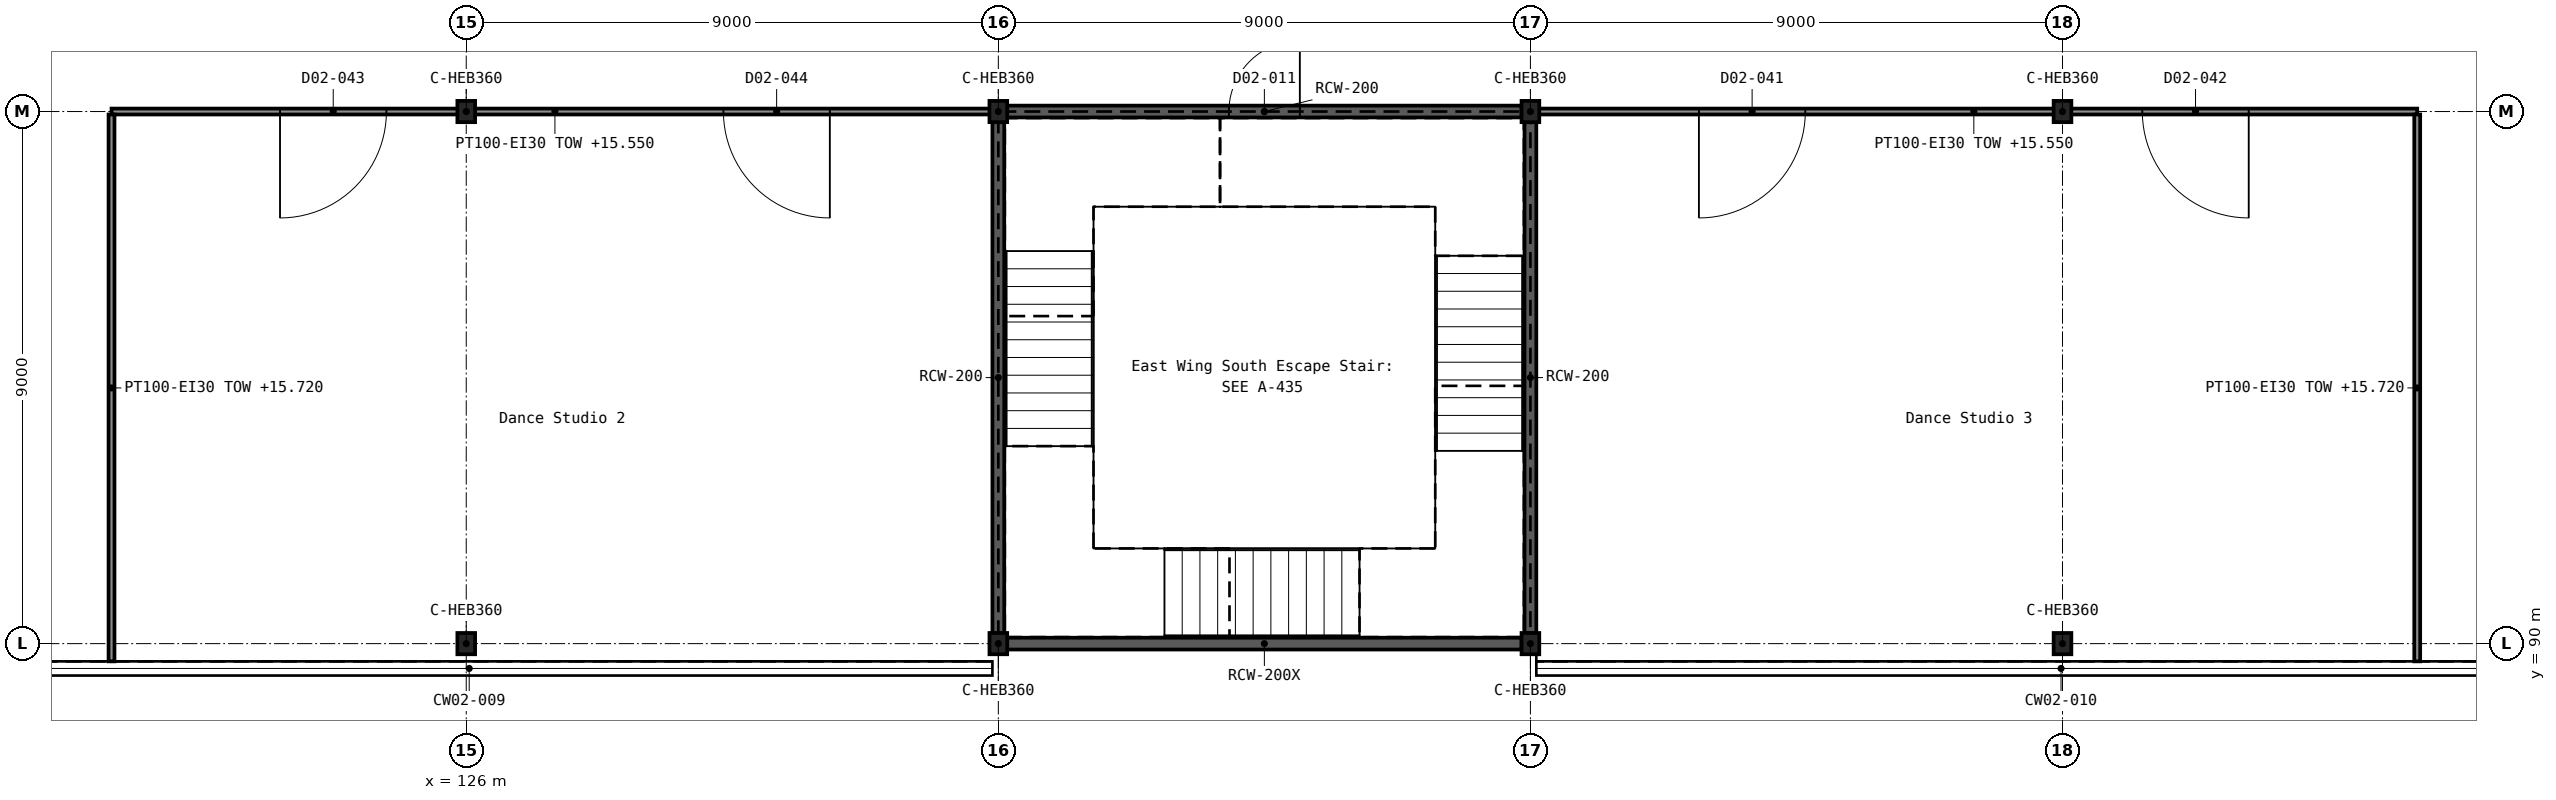
"""IFC4 building model, lengths in metres.
Left out: names, types, materials, properties, quantities, classifications, styles, units other than length and angle.
Written with IfcOpenShell. Run it as: python <this file> out.ifc"""

import sys

from ifc_helpers import new_model, si_unit, direction, frame, frame_2d, origin, origin_2d, place, context, subcontext, project, spatial, rectangle, i_section, extrude, element, fill, save


model = new_model("IFC4")
c1 = context("Model", 3, precision=1e-05, world=origin(), true_north=direction((0.0, 1.0)))
c2 = subcontext(c1, "Body", "Model", "MODEL_VIEW")
j1 = project(units=[si_unit("LENGTHUNIT", "METRE"), si_unit("PLANEANGLEUNIT", "RADIAN")], contexts=[c1])
p1 = place(None, origin())
s1 = spatial("IfcSite", under=j1, at=p1, CompositionType="ELEMENT")
p2 = place(p1, origin())
s2 = spatial("IfcBuilding", under=s1, at=p2, CompositionType="ELEMENT")
p3 = place(p2, frame((0.0, 0.0, 10.8)))
s3 = spatial("IfcBuildingStorey", under=s2, at=p3, CompositionType="ELEMENT", Elevation=10.8)
for number, where, z_axis, x_axis in (
    (1, (126.0, 90.0, 0.0), (0.0, 0.0, 1.0), (1.0, 0.0, 0.0)),
    (2, (135.0, 90.0, 0.0), (0.0, 0.0, 1.0), (1.0, 0.0, 0.0)),
    (3, (144.0, 90.0, 0.0), (0.0, 0.0, 1.0), (1.0, 0.0, 0.0)),
    (4, (153.0, 90.0, 0.0), (0.0, 0.0, 1.0), (1.0, 0.0, 0.0)),
    (5, (126.0, 99.0, 0.0), (0.0, 0.0, 1.0), (1.0, 0.0, 0.0)),
    (6, (135.0, 99.0, 0.0), (0.0, 0.0, 1.0), (1.0, 0.0, 0.0)),
    (7, (144.0, 99.0, 0.0), (0.0, 0.0, 1.0), (1.0, 0.0, 0.0)),
    (8, (153.0, 99.0, 0.0), (0.0, 0.0, 1.0), (1.0, 0.0, 0.0)),
):
    element("IfcColumn", number, at=place(p3, frame(where, z_axis=z_axis, x_axis=x_axis)), inside=s3, PredefinedType="COLUMN", context=c2, shape_type="SweptSolid", body=[
        extrude(i_section(OverallWidth=0.3, OverallDepth=0.36, WebThickness=0.012, FlangeThickness=0.022, FilletRadius=0.027, at=origin_2d()), origin(), (0.0, 0.0, 1.0), 5.4),
    ])
p4 = place(p3, frame((135.15, 90.0, 0.0), z_axis=(0.0, 0.0, 1.0), x_axis=(1.0, 0.0, 0.0)))
e9 = element("IfcWall", 9, at=p4, inside=s3, PredefinedType="SHEAR", context=c2, shape_type="SweptSolid", body=[
    extrude(rectangle(XDim=8.7, YDim=0.2, at=frame_2d((4.35, 0.0))), origin(), (0.0, 0.0, 1.0), 5.4),
])
p5 = place(p3, frame((135.15, 99.0, 0.0), z_axis=(0.0, 0.0, 1.0), x_axis=(1.0, 0.0, 0.0)))
e10 = element("IfcWall", 10, at=p5, inside=s3, PredefinedType="SHEAR", context=c2, shape_type="SweptSolid", body=[
    extrude(rectangle(XDim=8.7, YDim=0.2, at=frame_2d((4.35, 0.0))), origin(), (0.0, 0.0, 1.0), 5.4),
])
p6 = place(p5, frame((3.75, 0.0, 0.0)))
e11 = element("IfcOpeningElement", 11, at=p6, cuts=e10, PredefinedType="OPENING", context=c2, shape_type="SweptSolid", body=[
    extrude(rectangle(XDim=1.2, YDim=2.1, at=frame_2d((0.6, 1.05))), frame((0.0, 0.111, 0.0), z_axis=(0.0, -1.0, 0.0), x_axis=(1.0, 0.0, 0.0)), (0.0, 0.0, 1.0), 0.222),
])
for number, where, z_axis, x_axis in (
    (12, (135.0, 90.18, 0.0), (0.0, 0.0, 1.0), (0.0, 1.0, 0.0)),
    (13, (144.0, 90.18, 0.0), (0.0, 0.0, 1.0), (0.0, 1.0, 0.0)),
):
    element("IfcWall", number, at=place(p3, frame(where, z_axis=z_axis, x_axis=x_axis)), inside=s3, PredefinedType="SHEAR", context=c2, shape_type="SweptSolid", body=[
        extrude(rectangle(XDim=8.64, YDim=0.2, at=frame_2d((4.32, 0.0))), origin(), (0.0, 0.0, 1.0), 5.4),
    ])
p7 = place(p3, frame((120.0, 99.0, 0.0), z_axis=(0.0, 0.0, 1.0), x_axis=(1.0, 0.0, 0.0)))
e14 = element("IfcWall", 14, at=p7, inside=s3, PredefinedType="PARTITIONING", context=c2, shape_type="SweptSolid", body=[
    extrude(rectangle(XDim=15.0, YDim=0.1, at=frame_2d((7.5, 0.0))), origin(), (0.0, 0.0, 1.0), 4.75),
])
p8 = place(p7, frame((2.85, 0.0, 0.0)))
e15 = element("IfcOpeningElement", 15, at=p8, cuts=e14, PredefinedType="OPENING", context=c2, shape_type="SweptSolid", body=[
    extrude(rectangle(XDim=1.8, YDim=2.1, at=frame_2d((0.9, 1.05))), frame((0.0, 0.061, 0.0), z_axis=(0.0, -1.0, 0.0), x_axis=(1.0, 0.0, 0.0)), (0.0, 0.0, 1.0), 0.122),
])
p9 = place(p7, frame((10.35, 0.0, 0.0)))
e16 = element("IfcOpeningElement", 16, at=p9, cuts=e14, PredefinedType="OPENING", context=c2, shape_type="SweptSolid", body=[
    extrude(rectangle(XDim=1.8, YDim=2.1, at=frame_2d((0.9, 1.05))), frame((0.0, 0.061, 0.0), z_axis=(0.0, -1.0, 0.0), x_axis=(1.0, 0.0, 0.0)), (0.0, 0.0, 1.0), 0.122),
])
p10 = place(p3, frame((144.0, 99.0, 0.0), z_axis=(0.0, 0.0, 1.0), x_axis=(1.0, 0.0, 0.0)))
e17 = element("IfcWall", 17, at=p10, inside=s3, PredefinedType="PARTITIONING", context=c2, shape_type="SweptSolid", body=[
    extrude(rectangle(XDim=15.0, YDim=0.1, at=frame_2d((7.5, 0.0))), origin(), (0.0, 0.0, 1.0), 4.75),
])
p11 = place(p10, frame((2.85, 0.0, 0.0)))
e18 = element("IfcOpeningElement", 18, at=p11, cuts=e17, PredefinedType="OPENING", context=c2, shape_type="SweptSolid", body=[
    extrude(rectangle(XDim=1.8, YDim=2.1, at=frame_2d((0.9, 1.05))), frame((0.0, 0.061, 0.0), z_axis=(0.0, -1.0, 0.0), x_axis=(1.0, 0.0, 0.0)), (0.0, 0.0, 1.0), 0.122),
])
p12 = place(p10, frame((10.35, 0.0, 0.0)))
e19 = element("IfcOpeningElement", 19, at=p12, cuts=e17, PredefinedType="OPENING", context=c2, shape_type="SweptSolid", body=[
    extrude(rectangle(XDim=1.8, YDim=2.1, at=frame_2d((0.9, 1.05))), frame((0.0, 0.061, 0.0), z_axis=(0.0, -1.0, 0.0), x_axis=(1.0, 0.0, 0.0)), (0.0, 0.0, 1.0), 0.122),
])
for number, where, z_axis, x_axis in (
    (20, (120.0, 89.7, 0.0), (0.0, 0.0, 1.0), (0.0, 1.0, 0.0)),
    (21, (159.0, 89.7, 0.0), (0.0, 0.0, 1.0), (0.0, 1.0, 0.0)),
):
    element("IfcWall", number, at=place(p3, frame(where, z_axis=z_axis, x_axis=x_axis)), inside=s3, PredefinedType="PARTITIONING", context=c2, shape_type="SweptSolid", body=[
        extrude(rectangle(XDim=9.25, YDim=0.1, at=frame_2d((4.625, 0.0))), origin(), (0.0, 0.0, 1.0), 4.92),
    ])
p13 = place(p6, origin())
e22 = element("IfcDoor", 22, at=p13, inside=s3, OperationType="SINGLE_SWING_RIGHT", PredefinedType="DOOR", context=c2, shape_type="SweptSolid", body=[
    extrude(rectangle(XDim=1.2, YDim=2.1, at=frame_2d((0.6, 1.05))), frame((0.0, 0.025, 0.0), z_axis=(0.0, -1.0, 0.0), x_axis=(1.0, 0.0, 0.0)), (0.0, 0.0, 1.0), 0.05),
])
fill(e11, e22)
p14 = place(p11, frame((1.8, 0.0, 0.0), z_axis=(0.0, 0.0, 1.0), x_axis=(-1.0, 0.0, 0.0)))
e23 = element("IfcDoor", 23, at=p14, inside=s3, OperationType="DOUBLE_DOOR_SINGLE_SWING", PredefinedType="DOOR", context=c2, shape_type="SweptSolid", body=[
    extrude(rectangle(XDim=1.8, YDim=2.1, at=frame_2d((0.9, 1.05))), frame((0.0, 0.025, 0.0), z_axis=(0.0, -1.0, 0.0), x_axis=(1.0, 0.0, 0.0)), (0.0, 0.0, 1.0), 0.05),
])
fill(e18, e23)
p15 = place(p12, frame((1.8, 0.0, 0.0), z_axis=(0.0, 0.0, 1.0), x_axis=(-1.0, 0.0, 0.0)))
e24 = element("IfcDoor", 24, at=p15, inside=s3, OperationType="DOUBLE_DOOR_SINGLE_SWING", PredefinedType="DOOR", context=c2, shape_type="SweptSolid", body=[
    extrude(rectangle(XDim=1.8, YDim=2.1, at=frame_2d((0.9, 1.05))), frame((0.0, 0.025, 0.0), z_axis=(0.0, -1.0, 0.0), x_axis=(1.0, 0.0, 0.0)), (0.0, 0.0, 1.0), 0.05),
])
fill(e19, e24)
p16 = place(p8, frame((1.8, 0.0, 0.0), z_axis=(0.0, 0.0, 1.0), x_axis=(-1.0, 0.0, 0.0)))
e25 = element("IfcDoor", 25, at=p16, inside=s3, OperationType="DOUBLE_DOOR_SINGLE_SWING", PredefinedType="DOOR", context=c2, shape_type="SweptSolid", body=[
    extrude(rectangle(XDim=1.8, YDim=2.1, at=frame_2d((0.9, 1.05))), frame((0.0, 0.025, 0.0), z_axis=(0.0, -1.0, 0.0), x_axis=(1.0, 0.0, 0.0)), (0.0, 0.0, 1.0), 0.05),
])
fill(e15, e25)
p17 = place(p9, frame((1.8, 0.0, 0.0), z_axis=(0.0, 0.0, 1.0), x_axis=(-1.0, 0.0, 0.0)))
e26 = element("IfcDoor", 26, at=p17, inside=s3, OperationType="DOUBLE_DOOR_SINGLE_SWING", PredefinedType="DOOR", context=c2, shape_type="SweptSolid", body=[
    extrude(rectangle(XDim=1.8, YDim=2.1, at=frame_2d((0.9, 1.05))), frame((0.0, 0.025, 0.0), z_axis=(0.0, -1.0, 0.0), x_axis=(1.0, 0.0, 0.0)), (0.0, 0.0, 1.0), 0.05),
])
fill(e16, e26)
save(model, sys.argv[1])
